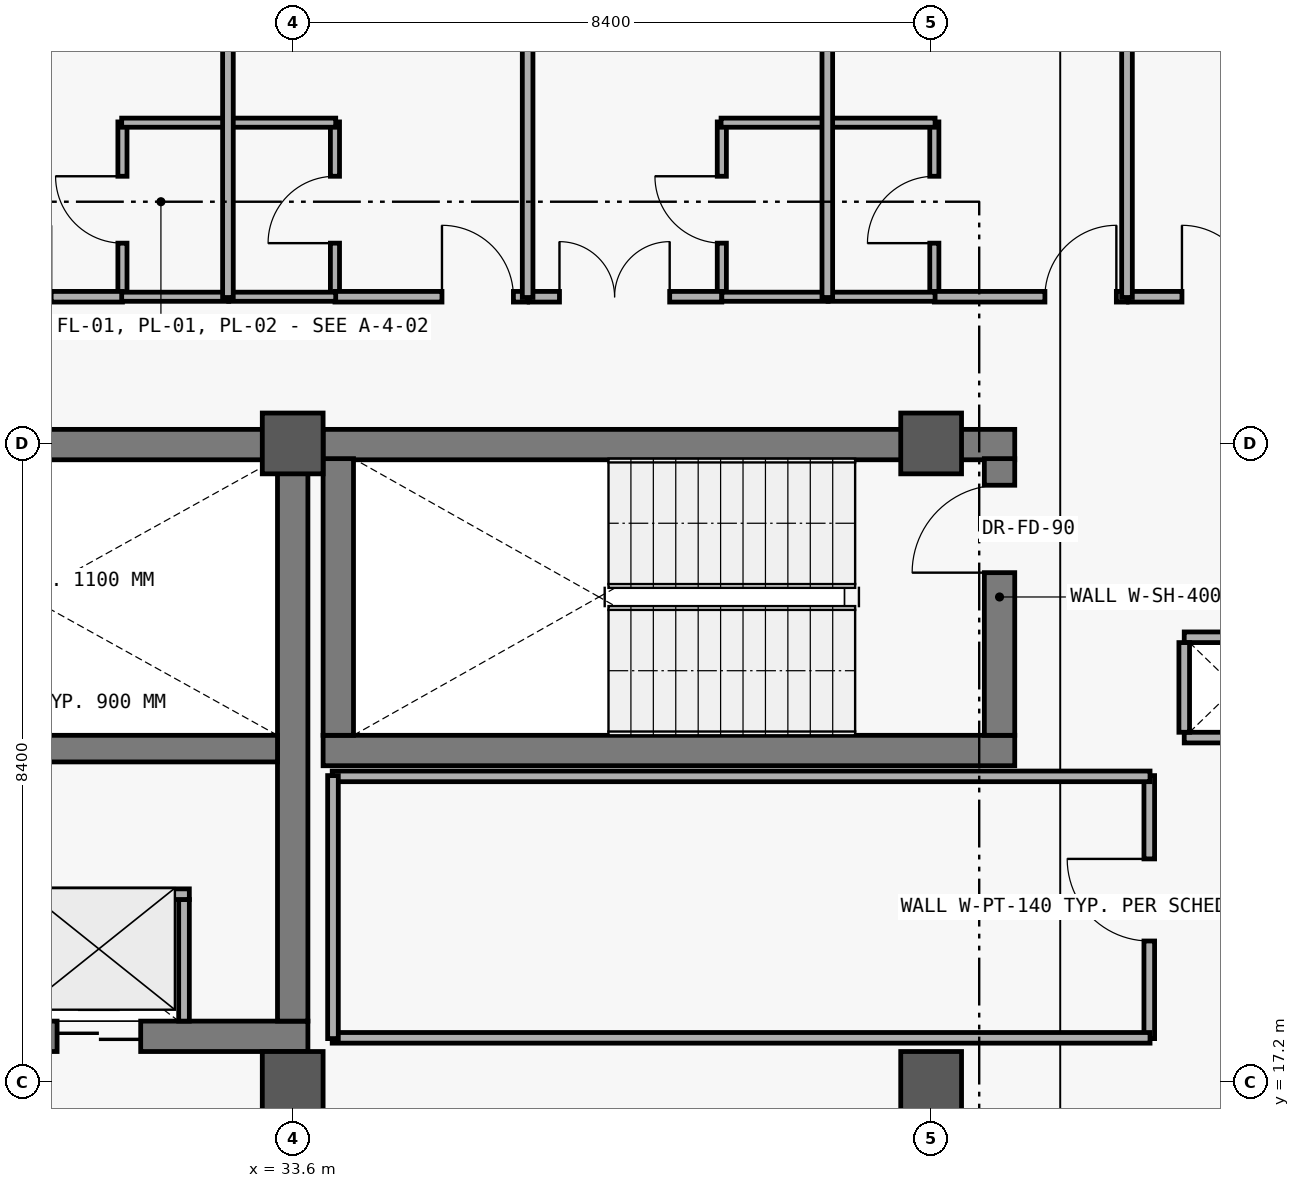
"""IFC4 building model, lengths in metres.
Left out: names, types, materials, properties, quantities, classifications, styles, units other than length and angle.
Written with IfcOpenShell. Run it as: python <this file> out.ifc"""

import sys

from ifc_helpers import new_model, si_unit, direction, frame, frame_2d, origin, origin_2d, place, context, subcontext, project, spatial, rectangle, extrude, element, fill, save


model = new_model("IFC4")
c1 = context("Model", 3, precision=1e-05, world=origin(), true_north=direction((0.0, 1.0)))
c2 = subcontext(c1, "Body", "Model", "MODEL_VIEW")
j1 = project(units=[si_unit("LENGTHUNIT", "METRE"), si_unit("PLANEANGLEUNIT", "RADIAN")], contexts=[c1])
p1 = place(None, origin())
s1 = spatial("IfcSite", under=j1, at=p1, CompositionType="ELEMENT")
p2 = place(p1, origin())
s2 = spatial("IfcBuilding", under=s1, at=p2, CompositionType="ELEMENT")
p3 = place(p2, frame((0.0, 0.0, 15.0)))
s3 = spatial("IfcBuildingStorey", under=s2, at=p3, CompositionType="ELEMENT", Elevation=15.0)
for number, where, z_axis, x_axis in (
    (1, (33.6, 17.2, 0.0), (0.0, 0.0, 1.0), (1.0, 0.0, 0.0)),
    (2, (33.6, 25.6, 0.0), (0.0, 0.0, 1.0), (1.0, 0.0, 0.0)),
    (3, (42.0, 17.2, 0.0), (0.0, 0.0, 1.0), (1.0, 0.0, 0.0)),
    (4, (42.0, 25.6, 0.0), (0.0, 0.0, 1.0), (1.0, 0.0, 0.0)),
):
    element("IfcColumn", number, at=place(p3, frame(where, z_axis=z_axis, x_axis=x_axis)), inside=s3, PredefinedType="COLUMN", context=c2, shape_type="SweptSolid", body=[
        extrude(rectangle(XDim=0.8, YDim=0.8, at=origin_2d()), origin(), (0.0, 0.0, 1.0), 4.2),
    ])
p4 = place(p3, frame((24.6, 17.8, 0.0), z_axis=(0.0, 0.0, 1.0), x_axis=(1.0, 0.0, 0.0)))
e5 = element("IfcWall", 5, at=p4, inside=s3, PredefinedType="SHEAR", context=c2, shape_type="SweptSolid", body=[
    extrude(rectangle(XDim=9.2, YDim=0.4, at=frame_2d((4.6, 0.0))), origin(), (0.0, 0.0, 1.0), 3.92),
])
p5 = place(p4, frame((1.1, 0.0, 0.0)))
e6 = element("IfcOpeningElement", 6, at=p5, cuts=e5, PredefinedType="OPENING", context=c2, shape_type="SweptSolid", body=[
    extrude(rectangle(XDim=1.2, YDim=2.2, at=frame_2d((0.6, 1.1))), frame((0.0, 0.21, 0.0), z_axis=(0.0, -1.0, 0.0), x_axis=(1.0, 0.0, 0.0)), (0.0, 0.0, 1.0), 0.42),
])
p6 = place(p4, frame((3.5, 0.0, 0.0)))
e7 = element("IfcOpeningElement", 7, at=p6, cuts=e5, PredefinedType="OPENING", context=c2, shape_type="SweptSolid", body=[
    extrude(rectangle(XDim=1.1, YDim=2.2, at=frame_2d((0.55, 1.1))), frame((0.0, 0.21, 0.0), z_axis=(0.0, -1.0, 0.0), x_axis=(1.0, 0.0, 0.0)), (0.0, 0.0, 1.0), 0.42),
])
p7 = place(p4, frame((5.9, 0.0, 0.0)))
e8 = element("IfcOpeningElement", 8, at=p7, cuts=e5, PredefinedType="OPENING", context=c2, shape_type="SweptSolid", body=[
    extrude(rectangle(XDim=1.1, YDim=2.2, at=frame_2d((0.55, 1.1))), frame((0.0, 0.21, 0.0), z_axis=(0.0, -1.0, 0.0), x_axis=(1.0, 0.0, 0.0)), (0.0, 0.0, 1.0), 0.42),
])
p8 = place(p3, frame((33.8, 25.585, 0.0), z_axis=(0.0, 0.0, 1.0), x_axis=(-1.0, 0.0, 0.0)))
e9 = element("IfcWall", 9, at=p8, inside=s3, PredefinedType="SHEAR", context=c2, shape_type="SweptSolid", body=[
    extrude(rectangle(XDim=9.2, YDim=0.4, at=frame_2d((4.6, 0.0))), origin(), (0.0, 0.0, 1.0), 3.92),
])
p9 = place(p3, frame((33.6, 18.0, 0.0), z_axis=(0.0, 0.0, 1.0), x_axis=(0.0, 1.0, 0.0)))
e10 = element("IfcWall", 10, at=p9, inside=s3, PredefinedType="SHEAR", context=c2, shape_type="SweptSolid", body=[
    extrude(rectangle(XDim=7.4, YDim=0.4, at=frame_2d((3.7, 0.0))), origin(), (0.0, 0.0, 1.0), 3.92),
])
p10 = place(p3, frame((25.0, 21.585, 0.0), z_axis=(0.0, 0.0, 1.0), x_axis=(1.0, 0.0, 0.0)))
e11 = element("IfcWall", 11, at=p10, inside=s3, PredefinedType="SHEAR", context=c2, shape_type="SweptSolid", body=[
    extrude(rectangle(XDim=8.4, YDim=0.35, at=frame_2d((4.2, 0.0))), origin(), (0.0, 0.0, 1.0), 3.92),
])
p11 = place(p3, frame((32.17, 18.0, 0.0), z_axis=(0.0, 0.0, 1.0), x_axis=(0.0, 1.0, 0.0)))
e12 = element("IfcWall", 12, at=p11, inside=s3, PredefinedType="PARTITIONING", context=c2, shape_type="SweptSolid", body=[
    extrude(rectangle(XDim=1.6, YDim=0.14, at=frame_2d((0.8, 0.0))), origin(), (0.0, 0.0, 1.0), 3.07),
])
p12 = place(p3, frame((25.06, 19.67, 0.0), z_axis=(0.0, 0.0, 1.0), x_axis=(1.0, 0.0, 0.0)))
e13 = element("IfcWall", 13, at=p12, inside=s3, PredefinedType="PARTITIONING", context=c2, shape_type="SweptSolid", body=[
    extrude(rectangle(XDim=7.18, YDim=0.14, at=frame_2d((3.59, 0.0))), origin(), (0.0, 0.0, 1.0), 3.07),
])
for number, where, z_axis, x_axis in (
    (14, (34.0, 21.56, 0.0), (0.0, 0.0, 1.0), (1.0, 0.0, 0.0)),
    (15, (43.1, 25.585, 0.0), (0.0, 0.0, 1.0), (-1.0, 0.0, 0.0)),
):
    element("IfcWall", number, at=place(p3, frame(where, z_axis=z_axis, x_axis=x_axis)), inside=s3, PredefinedType="SHEAR", context=c2, shape_type="SweptSolid", body=[
        extrude(rectangle(XDim=9.1, YDim=0.4, at=frame_2d((4.55, 0.0))), origin(), (0.0, 0.0, 1.0), 3.92),
    ])
p13 = place(p3, frame((34.2, 25.4, 0.0), z_axis=(0.0, 0.0, 1.0), x_axis=(0.0, -1.0, 0.0)))
e16 = element("IfcWall", 16, at=p13, inside=s3, PredefinedType="SHEAR", context=c2, shape_type="SweptSolid", body=[
    extrude(rectangle(XDim=3.64, YDim=0.4, at=frame_2d((1.82, 0.0))), origin(), (0.0, 0.0, 1.0), 3.92),
])
p14 = place(p3, frame((42.9, 21.76, 0.0), z_axis=(0.0, 0.0, 1.0), x_axis=(0.0, 1.0, 0.0)))
e17 = element("IfcWall", 17, at=p14, inside=s3, PredefinedType="SHEAR", context=c2, shape_type="SweptSolid", body=[
    extrude(rectangle(XDim=3.64, YDim=0.4, at=frame_2d((1.82, 0.0))), origin(), (0.0, 0.0, 1.0), 3.92),
])
p15 = place(p14, frame((2.14, 0.0, 0.0)))
e18 = element("IfcOpeningElement", 18, at=p15, cuts=e17, PredefinedType="OPENING", context=c2, shape_type="SweptSolid", body=[
    extrude(rectangle(XDim=1.15, YDim=2.2, at=frame_2d((0.575, 1.1))), frame((0.0, 0.21, 0.0), z_axis=(0.0, -1.0, 0.0), x_axis=(1.0, 0.0, 0.0)), (0.0, 0.0, 1.0), 0.42),
])
p16 = place(p3, frame((31.36, 27.52, 0.0), z_axis=(0.0, 0.0, 1.0), x_axis=(0.0, 1.0, 0.0)))
e19 = element("IfcWall", 19, at=p16, inside=s3, PredefinedType="PARTITIONING", context=c2, shape_type="SweptSolid", body=[
    extrude(rectangle(XDim=2.31, YDim=0.12, at=frame_2d((1.155, 0.0))), origin(), (0.0, 0.0, 1.0), 3.02),
])
p17 = place(p16, frame((0.715, 0.0, 0.0)))
e20 = element("IfcOpeningElement", 20, at=p17, cuts=e19, PredefinedType="OPENING", context=c2, shape_type="SweptSolid", body=[
    extrude(rectangle(XDim=0.88, YDim=2.15, at=frame_2d((0.44, 1.075))), frame((0.0, 0.07, 0.0), z_axis=(0.0, -1.0, 0.0), x_axis=(1.0, 0.0, 0.0)), (0.0, 0.0, 1.0), 0.14),
])
p18 = place(p3, frame((34.156, 27.52, 0.0), z_axis=(0.0, 0.0, 1.0), x_axis=(0.0, 1.0, 0.0)))
e21 = element("IfcWall", 21, at=p18, inside=s3, PredefinedType="PARTITIONING", context=c2, shape_type="SweptSolid", body=[
    extrude(rectangle(XDim=2.31, YDim=0.12, at=frame_2d((1.155, 0.0))), origin(), (0.0, 0.0, 1.0), 3.02),
])
p19 = place(p18, frame((0.715, 0.0, 0.0)))
e22 = element("IfcOpeningElement", 22, at=p19, cuts=e21, PredefinedType="OPENING", context=c2, shape_type="SweptSolid", body=[
    extrude(rectangle(XDim=0.88, YDim=2.15, at=frame_2d((0.44, 1.075))), frame((0.0, 0.07, 0.0), z_axis=(0.0, -1.0, 0.0), x_axis=(1.0, 0.0, 0.0)), (0.0, 0.0, 1.0), 0.14),
])
p20 = place(p3, frame((39.246, 27.52, 0.0), z_axis=(0.0, 0.0, 1.0), x_axis=(0.0, 1.0, 0.0)))
e23 = element("IfcWall", 23, at=p20, inside=s3, PredefinedType="PARTITIONING", context=c2, shape_type="SweptSolid", body=[
    extrude(rectangle(XDim=2.31, YDim=0.12, at=frame_2d((1.155, 0.0))), origin(), (0.0, 0.0, 1.0), 3.02),
])
p21 = place(p20, frame((0.715, 0.0, 0.0)))
e24 = element("IfcOpeningElement", 24, at=p21, cuts=e23, PredefinedType="OPENING", context=c2, shape_type="SweptSolid", body=[
    extrude(rectangle(XDim=0.88, YDim=2.15, at=frame_2d((0.44, 1.075))), frame((0.0, 0.07, 0.0), z_axis=(0.0, -1.0, 0.0), x_axis=(1.0, 0.0, 0.0)), (0.0, 0.0, 1.0), 0.14),
])
p22 = place(p3, frame((42.042, 27.52, 0.0), z_axis=(0.0, 0.0, 1.0), x_axis=(0.0, 1.0, 0.0)))
e25 = element("IfcWall", 25, at=p22, inside=s3, PredefinedType="PARTITIONING", context=c2, shape_type="SweptSolid", body=[
    extrude(rectangle(XDim=2.31, YDim=0.12, at=frame_2d((1.155, 0.0))), origin(), (0.0, 0.0, 1.0), 3.02),
])
p23 = place(p22, frame((0.715, 0.0, 0.0)))
e26 = element("IfcOpeningElement", 26, at=p23, cuts=e25, PredefinedType="OPENING", context=c2, shape_type="SweptSolid", body=[
    extrude(rectangle(XDim=0.88, YDim=2.15, at=frame_2d((0.44, 1.075))), frame((0.0, 0.07, 0.0), z_axis=(0.0, -1.0, 0.0), x_axis=(1.0, 0.0, 0.0)), (0.0, 0.0, 1.0), 0.14),
])
p24 = place(p3, frame((44.87, 17.77, 0.0), z_axis=(0.0, 0.0, 1.0), x_axis=(0.0, 1.0, 0.0)))
e27 = element("IfcWall", 27, at=p24, inside=s3, PredefinedType="PARTITIONING", context=c2, shape_type="SweptSolid", body=[
    extrude(rectangle(XDim=3.46, YDim=0.14, at=frame_2d((1.73, 0.0))), origin(), (0.0, 0.0, 1.0), 3.02),
])
p25 = place(p24, frame((1.284, 0.0, 0.0)))
e28 = element("IfcOpeningElement", 28, at=p25, cuts=e27, PredefinedType="OPENING", context=c2, shape_type="SweptSolid", body=[
    extrude(rectangle(XDim=1.08, YDim=2.25, at=frame_2d((0.54, 1.125))), frame((0.0, 0.08, 0.0), z_axis=(0.0, -1.0, 0.0), x_axis=(1.0, 0.0, 0.0)), (0.0, 0.0, 1.0), 0.16),
])
p26 = place(p3, frame((28.826, 27.53, 0.0), z_axis=(0.0, 0.0, 1.0), x_axis=(1.0, 0.0, 0.0)))
e29 = element("IfcWall", 29, at=p26, inside=s3, PredefinedType="PARTITIONING", context=c2, shape_type="SweptSolid", body=[
    extrude(rectangle(XDim=2.534, YDim=0.14, at=frame_2d((1.267, 0.0))), origin(), (0.0, 0.0, 1.0), 3.02),
])
p27 = place(p26, frame((0.656, 0.0, 0.0)))
e30 = element("IfcOpeningElement", 30, at=p27, cuts=e29, PredefinedType="OPENING", context=c2, shape_type="SweptSolid", body=[
    extrude(rectangle(XDim=0.94, YDim=2.2, at=frame_2d((0.47, 1.1))), frame((0.0, 0.08, 0.0), z_axis=(0.0, -1.0, 0.0), x_axis=(1.0, 0.0, 0.0)), (0.0, 0.0, 1.0), 0.16),
])
p28 = place(p3, frame((34.156, 27.53, 0.0), z_axis=(0.0, 0.0, 1.0), x_axis=(1.0, 0.0, 0.0)))
e31 = element("IfcWall", 31, at=p28, inside=s3, PredefinedType="PARTITIONING", context=c2, shape_type="SweptSolid", body=[
    extrude(rectangle(XDim=2.535, YDim=0.14, at=frame_2d((1.268, 0.0))), origin(), (0.0, 0.0, 1.0), 3.02),
])
p29 = place(p28, frame((1.408, 0.0, 0.0)))
e32 = element("IfcOpeningElement", 32, at=p29, cuts=e31, PredefinedType="OPENING", context=c2, shape_type="SweptSolid", body=[
    extrude(rectangle(XDim=0.94, YDim=2.2, at=frame_2d((0.47, 1.1))), frame((0.0, 0.08, 0.0), z_axis=(0.0, -1.0, 0.0), x_axis=(1.0, 0.0, 0.0)), (0.0, 0.0, 1.0), 0.16),
])
p30 = place(p3, frame((36.711, 27.53, 0.0), z_axis=(0.0, 0.0, 1.0), x_axis=(1.0, 0.0, 0.0)))
e33 = element("IfcWall", 33, at=p30, inside=s3, PredefinedType="PARTITIONING", context=c2, shape_type="SweptSolid", body=[
    extrude(rectangle(XDim=2.535, YDim=0.14, at=frame_2d((1.268, 0.0))), origin(), (0.0, 0.0, 1.0), 3.02),
])
p31 = place(p30, frame((0.399, 0.0, 0.0)))
e34 = element("IfcOpeningElement", 34, at=p31, cuts=e33, PredefinedType="OPENING", context=c2, shape_type="SweptSolid", body=[
    extrude(rectangle(XDim=1.45, YDim=2.3, at=frame_2d((0.725, 1.15))), frame((0.0, 0.08, 0.0), z_axis=(0.0, -1.0, 0.0), x_axis=(1.0, 0.0, 0.0)), (0.0, 0.0, 1.0), 0.16),
])
p32 = place(p3, frame((42.042, 27.53, 0.0), z_axis=(0.0, 0.0, 1.0), x_axis=(1.0, 0.0, 0.0)))
e35 = element("IfcWall", 35, at=p32, inside=s3, PredefinedType="PARTITIONING", context=c2, shape_type="SweptSolid", body=[
    extrude(rectangle(XDim=2.535, YDim=0.14, at=frame_2d((1.268, 0.0))), origin(), (0.0, 0.0, 1.0), 3.02),
])
p33 = place(p32, frame((1.455, 0.0, 0.0)))
e36 = element("IfcOpeningElement", 36, at=p33, cuts=e35, PredefinedType="OPENING", context=c2, shape_type="SweptSolid", body=[
    extrude(rectangle(XDim=0.94, YDim=2.2, at=frame_2d((0.47, 1.1))), frame((0.0, 0.08, 0.0), z_axis=(0.0, -1.0, 0.0), x_axis=(1.0, 0.0, 0.0)), (0.0, 0.0, 1.0), 0.16),
])
p34 = place(p3, frame((44.597, 27.53, 0.0), z_axis=(0.0, 0.0, 1.0), x_axis=(1.0, 0.0, 0.0)))
e37 = element("IfcWall", 37, at=p34, inside=s3, PredefinedType="PARTITIONING", context=c2, shape_type="SweptSolid", body=[
    extrude(rectangle(XDim=2.534, YDim=0.14, at=frame_2d((1.267, 0.0))), origin(), (0.0, 0.0, 1.0), 3.02),
])
p35 = place(p34, frame((0.703, 0.0, 0.0)))
e38 = element("IfcOpeningElement", 38, at=p35, cuts=e37, PredefinedType="OPENING", context=c2, shape_type="SweptSolid", body=[
    extrude(rectangle(XDim=0.94, YDim=2.2, at=frame_2d((0.47, 1.1))), frame((0.0, 0.08, 0.0), z_axis=(0.0, -1.0, 0.0), x_axis=(1.0, 0.0, 0.0)), (0.0, 0.0, 1.0), 0.16),
])
for number, where, z_axis, x_axis in (
    (39, (31.35, 27.53, 0.0), (0.0, 0.0, 1.0), (1.0, 0.0, 0.0)),
    (40, (31.35, 29.82, 0.0), (0.0, 0.0, 1.0), (1.0, 0.0, 0.0)),
    (41, (32.758, 27.53, 0.0), (0.0, 0.0, 1.0), (1.0, 0.0, 0.0)),
    (42, (32.758, 29.82, 0.0), (0.0, 0.0, 1.0), (1.0, 0.0, 0.0)),
):
    element("IfcWall", number, at=place(p3, frame(where, z_axis=z_axis, x_axis=x_axis)), inside=s3, PredefinedType="PARTITIONING", context=c2, shape_type="SweptSolid", body=[
        extrude(rectangle(XDim=1.408, YDim=0.12, at=frame_2d((0.704, 0.0))), origin(), (0.0, 0.0, 1.0), 3.02),
    ])
p36 = place(p3, frame((39.246, 27.53, 0.0), z_axis=(0.0, 0.0, 1.0), x_axis=(1.0, 0.0, 0.0)))
e43 = element("IfcWall", 43, at=p36, inside=s3, PredefinedType="PARTITIONING", context=c2, shape_type="SweptSolid", body=[
    extrude(rectangle(XDim=1.398, YDim=0.12, at=frame_2d((0.699, 0.0))), origin(), (0.0, 0.0, 1.0), 3.02),
])
for number, where, z_axis, x_axis in (
    (44, (39.236, 29.82, 0.0), (0.0, 0.0, 1.0), (1.0, 0.0, 0.0)),
    (45, (40.644, 27.53, 0.0), (0.0, 0.0, 1.0), (1.0, 0.0, 0.0)),
    (46, (40.644, 29.82, 0.0), (0.0, 0.0, 1.0), (1.0, 0.0, 0.0)),
):
    element("IfcWall", number, at=place(p3, frame(where, z_axis=z_axis, x_axis=x_axis)), inside=s3, PredefinedType="PARTITIONING", context=c2, shape_type="SweptSolid", body=[
        extrude(rectangle(XDim=1.408, YDim=0.12, at=frame_2d((0.704, 0.0))), origin(), (0.0, 0.0, 1.0), 3.02),
    ])
for number, where, z_axis, x_axis in (
    (47, (34.12, 17.78, 0.0), (0.0, 0.0, 1.0), (1.0, 0.0, 0.0)),
    (48, (34.12, 21.22, 0.0), (0.0, 0.0, 1.0), (1.0, 0.0, 0.0)),
):
    element("IfcWall", number, at=place(p3, frame(where, z_axis=z_axis, x_axis=x_axis)), inside=s3, PredefinedType="PARTITIONING", context=c2, shape_type="SweptSolid", body=[
        extrude(rectangle(XDim=10.76, YDim=0.14, at=frame_2d((5.38, 0.0))), origin(), (0.0, 0.0, 1.0), 3.02),
    ])
p37 = place(p3, frame((34.13, 17.77, 0.0), z_axis=(0.0, 0.0, 1.0), x_axis=(0.0, 1.0, 0.0)))
e49 = element("IfcWall", 49, at=p37, inside=s3, PredefinedType="PARTITIONING", context=c2, shape_type="SweptSolid", body=[
    extrude(rectangle(XDim=3.46, YDim=0.14, at=frame_2d((1.73, 0.0))), origin(), (0.0, 0.0, 1.0), 3.02),
])
for number, where, z_axis, x_axis in (
    (50, (32.748, 27.52, 0.0), (0.0, 0.0, 1.0), (0.0, 1.0, 0.0)),
    (51, (36.691, 27.52, 0.0), (0.0, 0.0, 1.0), (0.0, 1.0, 0.0)),
    (52, (40.634, 27.52, 0.0), (0.0, 0.0, 1.0), (0.0, 1.0, 0.0)),
    (53, (44.577, 27.52, 0.0), (0.0, 0.0, 1.0), (0.0, 1.0, 0.0)),
):
    element("IfcWall", number, at=place(p3, frame(where, z_axis=z_axis, x_axis=x_axis)), inside=s3, PredefinedType="PARTITIONING", context=c2, shape_type="SweptSolid", body=[
        extrude(rectangle(XDim=6.2, YDim=0.14, at=frame_2d((3.1, 0.0))), origin(), (0.0, 0.0, 1.0), 3.02),
    ])
for number, where, z_axis, x_axis in (
    (54, (45.33, 21.73, 0.0), (0.0, 0.0, 1.0), (1.0, 0.0, 0.0)),
    (55, (46.69, 23.05, 0.0), (0.0, 0.0, 1.0), (-1.0, 0.0, 0.0)),
):
    element("IfcWall", number, at=place(p3, frame(where, z_axis=z_axis, x_axis=x_axis)), inside=s3, PredefinedType="PARTITIONING", context=c2, shape_type="SweptSolid", body=[
        extrude(rectangle(XDim=1.36, YDim=0.14, at=frame_2d((0.68, 0.0))), origin(), (0.0, 0.0, 1.0), 3.04),
    ])
p38 = place(p3, frame((45.33, 22.98, 0.0), z_axis=(0.0, 0.0, 1.0), x_axis=(0.0, -1.0, 0.0)))
e56 = element("IfcWall", 56, at=p38, inside=s3, PredefinedType="PARTITIONING", context=c2, shape_type="SweptSolid", body=[
    extrude(rectangle(XDim=1.18, YDim=0.14, at=frame_2d((0.59, 0.0))), origin(), (0.0, 0.0, 1.0), 3.04),
])
p39 = place(p7, origin())
e57 = element("IfcDoor", 57, at=p39, inside=s3, OperationType="DOUBLE_DOOR_SLIDING", PredefinedType="DOOR", context=c2, shape_type="SweptSolid", body=[
    extrude(rectangle(XDim=1.1, YDim=2.2, at=frame_2d((0.55, 1.1))), frame((0.0, 0.025, 0.0), z_axis=(0.0, -1.0, 0.0), x_axis=(1.0, 0.0, 0.0)), (0.0, 0.0, 1.0), 0.05),
])
fill(e8, e57)
p40 = place(p15, origin())
e58 = element("IfcDoor", 58, at=p40, inside=s3, OperationType="SINGLE_SWING_LEFT", PredefinedType="DOOR", context=c2, shape_type="SweptSolid", body=[
    extrude(rectangle(XDim=1.15, YDim=2.2, at=frame_2d((0.575, 1.1))), frame((0.0, 0.025, 0.0), z_axis=(0.0, -1.0, 0.0), x_axis=(1.0, 0.0, 0.0)), (0.0, 0.0, 1.0), 0.05),
])
fill(e18, e58)
p41 = place(p17, origin())
e59 = element("IfcDoor", 59, at=p41, inside=s3, OperationType="SINGLE_SWING_RIGHT", PredefinedType="DOOR", context=c2, shape_type="SweptSolid", body=[
    extrude(rectangle(XDim=0.88, YDim=2.15, at=frame_2d((0.44, 1.075))), frame((0.0, 0.025, 0.0), z_axis=(0.0, -1.0, 0.0), x_axis=(1.0, 0.0, 0.0)), (0.0, 0.0, 1.0), 0.05),
])
fill(e20, e59)
p42 = place(p19, origin())
e60 = element("IfcDoor", 60, at=p42, inside=s3, OperationType="SINGLE_SWING_LEFT", PredefinedType="DOOR", context=c2, shape_type="SweptSolid", body=[
    extrude(rectangle(XDim=0.88, YDim=2.15, at=frame_2d((0.44, 1.075))), frame((0.0, 0.025, 0.0), z_axis=(0.0, -1.0, 0.0), x_axis=(1.0, 0.0, 0.0)), (0.0, 0.0, 1.0), 0.05),
])
fill(e22, e60)
p43 = place(p21, origin())
e61 = element("IfcDoor", 61, at=p43, inside=s3, OperationType="SINGLE_SWING_RIGHT", PredefinedType="DOOR", context=c2, shape_type="SweptSolid", body=[
    extrude(rectangle(XDim=0.88, YDim=2.15, at=frame_2d((0.44, 1.075))), frame((0.0, 0.025, 0.0), z_axis=(0.0, -1.0, 0.0), x_axis=(1.0, 0.0, 0.0)), (0.0, 0.0, 1.0), 0.05),
])
fill(e24, e61)
p44 = place(p23, origin())
e62 = element("IfcDoor", 62, at=p44, inside=s3, OperationType="SINGLE_SWING_LEFT", PredefinedType="DOOR", context=c2, shape_type="SweptSolid", body=[
    extrude(rectangle(XDim=0.88, YDim=2.15, at=frame_2d((0.44, 1.075))), frame((0.0, 0.025, 0.0), z_axis=(0.0, -1.0, 0.0), x_axis=(1.0, 0.0, 0.0)), (0.0, 0.0, 1.0), 0.05),
])
fill(e26, e62)
p45 = place(p25, origin())
e63 = element("IfcDoor", 63, at=p45, inside=s3, OperationType="SINGLE_SWING_RIGHT", PredefinedType="DOOR", context=c2, shape_type="SweptSolid", body=[
    extrude(rectangle(XDim=1.08, YDim=2.25, at=frame_2d((0.54, 1.125))), frame((0.0, 0.025, 0.0), z_axis=(0.0, -1.0, 0.0), x_axis=(1.0, 0.0, 0.0)), (0.0, 0.0, 1.0), 0.05),
])
fill(e28, e63)
p46 = place(p29, origin())
e64 = element("IfcDoor", 64, at=p46, inside=s3, OperationType="SINGLE_SWING_LEFT", PredefinedType="DOOR", context=c2, shape_type="SweptSolid", body=[
    extrude(rectangle(XDim=0.94, YDim=2.2, at=frame_2d((0.47, 1.1))), frame((0.0, 0.025, 0.0), z_axis=(0.0, -1.0, 0.0), x_axis=(1.0, 0.0, 0.0)), (0.0, 0.0, 1.0), 0.05),
])
fill(e32, e64)
p47 = place(p31, origin())
e65 = element("IfcDoor", 65, at=p47, inside=s3, OperationType="DOUBLE_DOOR_SINGLE_SWING", PredefinedType="DOOR", context=c2, shape_type="SweptSolid", body=[
    extrude(rectangle(XDim=1.45, YDim=2.3, at=frame_2d((0.725, 1.15))), frame((0.0, 0.025, 0.0), z_axis=(0.0, -1.0, 0.0), x_axis=(1.0, 0.0, 0.0)), (0.0, 0.0, 1.0), 0.05),
])
fill(e34, e65)
p48 = place(p33, origin())
e66 = element("IfcDoor", 66, at=p48, inside=s3, OperationType="SINGLE_SWING_RIGHT", PredefinedType="DOOR", context=c2, shape_type="SweptSolid", body=[
    extrude(rectangle(XDim=0.94, YDim=2.2, at=frame_2d((0.47, 1.1))), frame((0.0, 0.025, 0.0), z_axis=(0.0, -1.0, 0.0), x_axis=(1.0, 0.0, 0.0)), (0.0, 0.0, 1.0), 0.05),
])
fill(e36, e66)
p49 = place(p35, origin())
e67 = element("IfcDoor", 67, at=p49, inside=s3, OperationType="SINGLE_SWING_LEFT", PredefinedType="DOOR", context=c2, shape_type="SweptSolid", body=[
    extrude(rectangle(XDim=0.94, YDim=2.2, at=frame_2d((0.47, 1.1))), frame((0.0, 0.025, 0.0), z_axis=(0.0, -1.0, 0.0), x_axis=(1.0, 0.0, 0.0)), (0.0, 0.0, 1.0), 0.05),
])
fill(e38, e67)
save(model, sys.argv[1])
